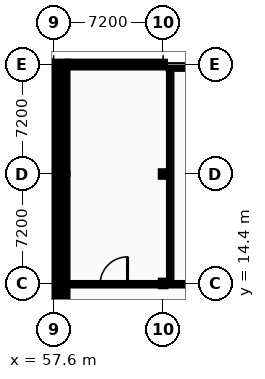
"""IFC4 building model, lengths in metres.
Left out: names, types, materials, properties, quantities, classifications, styles, units other than length and angle.
Written with IfcOpenShell. Run it as: python <this file> out.ifc"""

import sys

from ifc_helpers import new_model, si_unit, direction, frame, frame_2d, origin, origin_2d, place, context, subcontext, project, spatial, rectangle, i_section, extrude, element, fill, save


model = new_model("IFC4")
c1 = context("Model", 3, precision=1e-05, world=origin(), true_north=direction((0.0, 1.0)))
c2 = subcontext(c1, "Body", "Model", "MODEL_VIEW")
j1 = project(units=[si_unit("LENGTHUNIT", "METRE"), si_unit("PLANEANGLEUNIT", "RADIAN")], contexts=[c1])
p1 = place(None, origin())
s1 = spatial("IfcSite", under=j1, at=p1, CompositionType="ELEMENT")
p2 = place(p1, origin())
s2 = spatial("IfcBuilding", under=s1, at=p2, CompositionType="ELEMENT")
p3 = place(p2, frame((0.0, 0.0, 9.6)))
s3 = spatial("IfcBuildingStorey", under=s2, at=p3, CompositionType="ELEMENT", Elevation=9.6)
for number, where, z_axis, x_axis in (
    (1, (57.6, 14.4, 0.0), (0.0, 0.0, 1.0), (1.0, 0.0, 0.0)),
    (2, (57.6, 21.6, 0.0), (0.0, 0.0, 1.0), (1.0, 0.0, 0.0)),
):
    element("IfcColumn", number, at=place(p3, frame(where, z_axis=z_axis, x_axis=x_axis)), inside=s3, PredefinedType="COLUMN", context=c2, shape_type="SweptSolid", body=[
        extrude(i_section(OverallWidth=0.3, OverallDepth=0.36, WebThickness=0.012, FlangeThickness=0.022, FilletRadius=0.027, at=origin_2d()), origin(), (0.0, 0.0, 1.0), 4.4),
    ])
p4 = place(p3, frame((57.6, 28.8, 0.0), z_axis=(0.0, 0.0, 1.0), x_axis=(1.0, 0.0, 0.0)))
e3 = element("IfcColumn", 3, at=p4, inside=s3, PredefinedType="COLUMN", context=c2, shape_type="SweptSolid", body=[
    extrude(i_section(OverallWidth=0.24, OverallDepth=0.24, WebThickness=0.01, FlangeThickness=0.017, FilletRadius=0.021, at=origin_2d()), origin(), (0.0, 0.0, 1.0), 4.4),
])
for number, where, z_axis, x_axis in (
    (4, (58.32, 14.4, 0.0), (0.0, 0.0, 1.0), (1.0, 0.0, 0.0)),
    (5, (58.32, 21.6, 0.0), (0.0, 0.0, 1.0), (1.0, 0.0, 0.0)),
):
    element("IfcColumn", number, at=place(p3, frame(where, z_axis=z_axis, x_axis=x_axis)), inside=s3, PredefinedType="COLUMN", context=c2, shape_type="SweptSolid", body=[
        extrude(i_section(OverallWidth=0.3, OverallDepth=0.36, WebThickness=0.012, FlangeThickness=0.022, FilletRadius=0.027, at=origin_2d()), origin(), (0.0, 0.0, 1.0), 4.4),
    ])
p5 = place(p3, frame((58.32, 28.8, 0.0), z_axis=(0.0, 0.0, 1.0), x_axis=(1.0, 0.0, 0.0)))
e6 = element("IfcColumn", 6, at=p5, inside=s3, PredefinedType="COLUMN", context=c2, shape_type="SweptSolid", body=[
    extrude(i_section(OverallWidth=0.24, OverallDepth=0.24, WebThickness=0.01, FlangeThickness=0.017, FilletRadius=0.021, at=origin_2d()), origin(), (0.0, 0.0, 1.0), 4.4),
])
for number, where, z_axis, x_axis in (
    (7, (64.8, 14.4, 0.0), (0.0, 0.0, 1.0), (1.0, 0.0, 0.0)),
    (8, (64.8, 21.6, 0.0), (0.0, 0.0, 1.0), (1.0, 0.0, 0.0)),
):
    element("IfcColumn", number, at=place(p3, frame(where, z_axis=z_axis, x_axis=x_axis)), inside=s3, PredefinedType="COLUMN", context=c2, shape_type="SweptSolid", body=[
        extrude(i_section(OverallWidth=0.3, OverallDepth=0.36, WebThickness=0.012, FlangeThickness=0.022, FilletRadius=0.027, at=origin_2d()), origin(), (0.0, 0.0, 1.0), 4.4),
    ])
p6 = place(p3, frame((64.8, 28.8, 0.0), z_axis=(0.0, 0.0, 1.0), x_axis=(1.0, 0.0, 0.0)))
e9 = element("IfcColumn", 9, at=p6, inside=s3, PredefinedType="COLUMN", context=c2, shape_type="SweptSolid", body=[
    extrude(i_section(OverallWidth=0.24, OverallDepth=0.24, WebThickness=0.01, FlangeThickness=0.017, FilletRadius=0.021, at=origin_2d()), origin(), (0.0, 0.0, 1.0), 4.4),
])
p7 = place(p3, frame((57.6, 8.9, 0.0), z_axis=(0.0, 0.0, 1.0), x_axis=(0.0, 1.0, 0.0)))
e10 = element("IfcWall", 10, at=p7, inside=s3, PredefinedType="STANDARD", context=c2, shape_type="SweptSolid", body=[
    extrude(rectangle(XDim=5.5, YDim=0.38, at=frame_2d((2.75, 0.0))), origin(), (0.0, 0.0, 1.0), 4.2),
])
p8 = place(p3, frame((57.6, 14.4, 0.0), z_axis=(0.0, 0.0, 1.0), x_axis=(0.0, 1.0, 0.0)))
e11 = element("IfcWall", 11, at=p8, inside=s3, PredefinedType="STANDARD", context=c2, shape_type="SweptSolid", body=[
    extrude(rectangle(XDim=7.2, YDim=0.38, at=frame_2d((3.6, 0.0))), origin(), (0.0, 0.0, 1.0), 3.895),
])
p9 = place(p8, frame((1.594, 0.0, 0.95)))
e12 = element("IfcOpeningElement", 12, at=p9, cuts=e11, PredefinedType="OPENING", context=c2, shape_type="SweptSolid", body=[
    extrude(rectangle(XDim=1.132, YDim=1.368, at=frame_2d((0.566, 0.684))), frame((0.0, 0.2, 0.0), z_axis=(0.0, -1.0, 0.0), x_axis=(1.0, 0.0, 0.0)), (0.0, 0.0, 1.0), 0.4),
])
p10 = place(p8, frame((4.474, 0.0, 0.95)))
e13 = element("IfcOpeningElement", 13, at=p10, cuts=e11, PredefinedType="OPENING", context=c2, shape_type="SweptSolid", body=[
    extrude(rectangle(XDim=1.132, YDim=1.368, at=frame_2d((0.566, 0.684))), frame((0.0, 0.2, 0.0), z_axis=(0.0, -1.0, 0.0), x_axis=(1.0, 0.0, 0.0)), (0.0, 0.0, 1.0), 0.4),
])
p11 = place(p3, frame((57.6, 21.6, 0.0), z_axis=(0.0, 0.0, 1.0), x_axis=(0.0, 1.0, 0.0)))
e14 = element("IfcWall", 14, at=p11, inside=s3, PredefinedType="STANDARD", context=c2, shape_type="SweptSolid", body=[
    extrude(rectangle(XDim=7.39, YDim=0.38, at=frame_2d((3.695, 0.0))), origin(), (0.0, 0.0, 1.0), 3.9),
])
p12 = place(p11, frame((1.634, 0.0, 0.95)))
e15 = element("IfcOpeningElement", 15, at=p12, cuts=e14, PredefinedType="OPENING", context=c2, shape_type="SweptSolid", body=[
    extrude(rectangle(XDim=1.166, YDim=1.368, at=frame_2d((0.583, 0.684))), frame((0.0, 0.2, 0.0), z_axis=(0.0, -1.0, 0.0), x_axis=(1.0, 0.0, 0.0)), (0.0, 0.0, 1.0), 0.4),
])
p13 = place(p11, frame((4.59, 0.0, 0.95)))
e16 = element("IfcOpeningElement", 16, at=p13, cuts=e14, PredefinedType="OPENING", context=c2, shape_type="SweptSolid", body=[
    extrude(rectangle(XDim=1.166, YDim=1.368, at=frame_2d((0.583, 0.684))), frame((0.0, 0.2, 0.0), z_axis=(0.0, -1.0, 0.0), x_axis=(1.0, 0.0, 0.0)), (0.0, 0.0, 1.0), 0.4),
])
p14 = place(p3, frame((64.91, 28.8, 0.0), z_axis=(0.0, 0.0, 1.0), x_axis=(-1.0, 0.0, 0.0)))
e17 = element("IfcWall", 17, at=p14, inside=s3, PredefinedType="STANDARD", context=c2, shape_type="SweptSolid", body=[
    extrude(rectangle(XDim=6.4, YDim=0.38, at=frame_2d((3.2, 0.0))), origin(), (0.0, 0.0, 1.0), 3.9),
])
p15 = place(p3, frame((58.32, 14.4, 0.0), z_axis=(0.0, 0.0, 1.0), x_axis=(0.0, -1.0, 0.0)))
e18 = element("IfcWall", 18, at=p15, inside=s3, PredefinedType="STANDARD", context=c2, shape_type="SweptSolid", body=[
    extrude(rectangle(XDim=5.5, YDim=0.38, at=frame_2d((2.75, 0.0))), origin(), (0.0, 0.0, 1.0), 4.2),
])
p16 = place(p3, frame((58.32, 21.6, 0.0), z_axis=(0.0, 0.0, 1.0), x_axis=(0.0, -1.0, 0.0)))
e19 = element("IfcWall", 19, at=p16, inside=s3, PredefinedType="STANDARD", context=c2, shape_type="SweptSolid", body=[
    extrude(rectangle(XDim=7.2, YDim=0.38, at=frame_2d((3.6, 0.0))), origin(), (0.0, 0.0, 1.0), 3.895),
])
p17 = place(p16, frame((1.713, 0.0, 0.95)))
e20 = element("IfcOpeningElement", 20, at=p17, cuts=e19, PredefinedType="OPENING", context=c2, shape_type="SweptSolid", body=[
    extrude(rectangle(XDim=0.894, YDim=1.332, at=frame_2d((0.447, 0.666))), frame((0.0, 0.2, 0.0), z_axis=(0.0, -1.0, 0.0), x_axis=(1.0, 0.0, 0.0)), (0.0, 0.0, 1.0), 0.4),
])
p18 = place(p16, frame((4.593, 0.0, 0.95)))
e21 = element("IfcOpeningElement", 21, at=p18, cuts=e19, PredefinedType="OPENING", context=c2, shape_type="SweptSolid", body=[
    extrude(rectangle(XDim=0.894, YDim=1.332, at=frame_2d((0.447, 0.666))), frame((0.0, 0.2, 0.0), z_axis=(0.0, -1.0, 0.0), x_axis=(1.0, 0.0, 0.0)), (0.0, 0.0, 1.0), 0.4),
])
p19 = place(p3, frame((58.32, 28.99, 0.0), z_axis=(0.0, 0.0, 1.0), x_axis=(0.0, -1.0, 0.0)))
e22 = element("IfcWall", 22, at=p19, inside=s3, PredefinedType="STANDARD", context=c2, shape_type="SweptSolid", body=[
    extrude(rectangle(XDim=7.39, YDim=0.38, at=frame_2d((3.695, 0.0))), origin(), (0.0, 0.0, 1.0), 3.9),
])
p20 = place(p19, frame((1.753, 0.0, 0.95)))
e23 = element("IfcOpeningElement", 23, at=p20, cuts=e22, PredefinedType="OPENING", context=c2, shape_type="SweptSolid", body=[
    extrude(rectangle(XDim=0.928, YDim=1.332, at=frame_2d((0.464, 0.666))), frame((0.0, 0.2, 0.0), z_axis=(0.0, -1.0, 0.0), x_axis=(1.0, 0.0, 0.0)), (0.0, 0.0, 1.0), 0.4),
])
p21 = place(p19, frame((4.709, 0.0, 0.95)))
e24 = element("IfcOpeningElement", 24, at=p21, cuts=e22, PredefinedType="OPENING", context=c2, shape_type="SweptSolid", body=[
    extrude(rectangle(XDim=0.928, YDim=1.332, at=frame_2d((0.464, 0.666))), frame((0.0, 0.2, 0.0), z_axis=(0.0, -1.0, 0.0), x_axis=(1.0, 0.0, 0.0)), (0.0, 0.0, 1.0), 0.4),
])
p22 = place(p3, frame((58.7, 14.35, 0.0), z_axis=(0.0, 0.0, 1.0), x_axis=(1.0, 0.0, 0.0)))
e25 = element("IfcWall", 25, at=p22, inside=s3, PredefinedType="PARTITIONING", context=c2, shape_type="SweptSolid", body=[
    extrude(rectangle(XDim=5.72, YDim=0.16, at=frame_2d((2.86, 0.0))), origin(), (0.0, 0.0, 1.0), 3.895),
])
p23 = place(p22, frame((1.96, 0.0, 0.0)))
e26 = element("IfcOpeningElement", 26, at=p23, cuts=e25, PredefinedType="OPENING", context=c2, shape_type="SweptSolid", body=[
    extrude(rectangle(XDim=1.8, YDim=2.3, at=frame_2d((0.9, 1.15))), frame((0.0, 0.09, 0.0), z_axis=(0.0, -1.0, 0.0), x_axis=(1.0, 0.0, 0.0)), (0.0, 0.0, 1.0), 0.18),
])
p24 = place(p3, frame((65.18, 14.35, 0.0), z_axis=(0.0, 0.0, 1.0), x_axis=(1.0, 0.0, 0.0)))
e27 = element("IfcWall", 27, at=p24, inside=s3, PredefinedType="PARTITIONING", context=c2, shape_type="SweptSolid", body=[
    extrude(rectangle(XDim=6.44, YDim=0.16, at=frame_2d((3.22, 0.0))), origin(), (0.0, 0.0, 1.0), 3.895),
])
p25 = place(p24, frame((2.515, 0.0, 0.0)))
e28 = element("IfcOpeningElement", 28, at=p25, cuts=e27, PredefinedType="OPENING", context=c2, shape_type="SweptSolid", body=[
    extrude(rectangle(XDim=1.5, YDim=2.2, at=frame_2d((0.75, 1.1))), frame((0.0, 0.09, 0.0), z_axis=(0.0, -1.0, 0.0), x_axis=(1.0, 0.0, 0.0)), (0.0, 0.0, 1.0), 0.18),
])
p26 = place(p3, frame((65.18, 28.6, 0.0), z_axis=(0.0, 0.0, 1.0), x_axis=(1.0, 0.0, 0.0)))
e29 = element("IfcWall", 29, at=p26, inside=s3, PredefinedType="PARTITIONING", context=c2, shape_type="SweptSolid", body=[
    extrude(rectangle(XDim=6.44, YDim=0.16, at=frame_2d((3.22, 0.0))), origin(), (0.0, 0.0, 1.0), 3.9),
])
p27 = place(p3, frame((65.27, 14.43, 0.0), z_axis=(0.0, 0.0, 1.0), x_axis=(0.0, 1.0, 0.0)))
e30 = element("IfcWall", 30, at=p27, inside=s3, PredefinedType="PARTITIONING", context=c2, shape_type="SweptSolid", body=[
    extrude(rectangle(XDim=14.09, YDim=0.16, at=frame_2d((7.045, 0.0))), origin(), (0.0, 0.0, 1.0), 4.2),
])
p28 = place(p9, origin())
e31 = element("IfcWindow", 31, at=p28, inside=s3, PartitioningType="SINGLE_PANEL", PredefinedType="WINDOW", context=c2, shape_type="SweptSolid", body=[
    extrude(rectangle(XDim=1.132, YDim=1.368, at=frame_2d((0.566, 0.684))), frame((0.0, 0.03, 0.0), z_axis=(0.0, -1.0, 0.0), x_axis=(1.0, 0.0, 0.0)), (0.0, 0.0, 1.0), 0.06),
])
fill(e12, e31)
p29 = place(p10, origin())
e32 = element("IfcWindow", 32, at=p29, inside=s3, PartitioningType="SINGLE_PANEL", PredefinedType="WINDOW", context=c2, shape_type="SweptSolid", body=[
    extrude(rectangle(XDim=1.132, YDim=1.368, at=frame_2d((0.566, 0.684))), frame((0.0, 0.03, 0.0), z_axis=(0.0, -1.0, 0.0), x_axis=(1.0, 0.0, 0.0)), (0.0, 0.0, 1.0), 0.06),
])
fill(e13, e32)
p30 = place(p12, origin())
e33 = element("IfcWindow", 33, at=p30, inside=s3, PartitioningType="SINGLE_PANEL", PredefinedType="WINDOW", context=c2, shape_type="SweptSolid", body=[
    extrude(rectangle(XDim=1.166, YDim=1.368, at=frame_2d((0.583, 0.684))), frame((0.0, 0.03, 0.0), z_axis=(0.0, -1.0, 0.0), x_axis=(1.0, 0.0, 0.0)), (0.0, 0.0, 1.0), 0.06),
])
fill(e15, e33)
p31 = place(p13, origin())
e34 = element("IfcWindow", 34, at=p31, inside=s3, PartitioningType="SINGLE_PANEL", PredefinedType="WINDOW", context=c2, shape_type="SweptSolid", body=[
    extrude(rectangle(XDim=1.166, YDim=1.368, at=frame_2d((0.583, 0.684))), frame((0.0, 0.03, 0.0), z_axis=(0.0, -1.0, 0.0), x_axis=(1.0, 0.0, 0.0)), (0.0, 0.0, 1.0), 0.06),
])
fill(e16, e34)
p32 = place(p17, origin())
e35 = element("IfcWindow", 35, at=p32, inside=s3, PartitioningType="SINGLE_PANEL", PredefinedType="WINDOW", context=c2, shape_type="SweptSolid", body=[
    extrude(rectangle(XDim=0.894, YDim=1.332, at=frame_2d((0.447, 0.666))), frame((0.0, 0.03, 0.0), z_axis=(0.0, -1.0, 0.0), x_axis=(1.0, 0.0, 0.0)), (0.0, 0.0, 1.0), 0.06),
])
fill(e20, e35)
p33 = place(p18, origin())
e36 = element("IfcWindow", 36, at=p33, inside=s3, PartitioningType="SINGLE_PANEL", PredefinedType="WINDOW", context=c2, shape_type="SweptSolid", body=[
    extrude(rectangle(XDim=0.894, YDim=1.332, at=frame_2d((0.447, 0.666))), frame((0.0, 0.03, 0.0), z_axis=(0.0, -1.0, 0.0), x_axis=(1.0, 0.0, 0.0)), (0.0, 0.0, 1.0), 0.06),
])
fill(e21, e36)
p34 = place(p20, origin())
e37 = element("IfcWindow", 37, at=p34, inside=s3, PartitioningType="SINGLE_PANEL", PredefinedType="WINDOW", context=c2, shape_type="SweptSolid", body=[
    extrude(rectangle(XDim=0.928, YDim=1.332, at=frame_2d((0.464, 0.666))), frame((0.0, 0.03, 0.0), z_axis=(0.0, -1.0, 0.0), x_axis=(1.0, 0.0, 0.0)), (0.0, 0.0, 1.0), 0.06),
])
fill(e23, e37)
p35 = place(p21, origin())
e38 = element("IfcWindow", 38, at=p35, inside=s3, PartitioningType="SINGLE_PANEL", PredefinedType="WINDOW", context=c2, shape_type="SweptSolid", body=[
    extrude(rectangle(XDim=0.928, YDim=1.332, at=frame_2d((0.464, 0.666))), frame((0.0, 0.03, 0.0), z_axis=(0.0, -1.0, 0.0), x_axis=(1.0, 0.0, 0.0)), (0.0, 0.0, 1.0), 0.06),
])
fill(e24, e38)
p36 = place(p23, frame((1.8, 0.0, 0.0), z_axis=(0.0, 0.0, 1.0), x_axis=(-1.0, 0.0, 0.0)))
e39 = element("IfcDoor", 39, at=p36, inside=s3, OperationType="DOUBLE_DOOR_SINGLE_SWING", PredefinedType="DOOR", context=c2, shape_type="SweptSolid", body=[
    extrude(rectangle(XDim=1.8, YDim=2.3, at=frame_2d((0.9, 1.15))), frame((0.0, 0.025, 0.0), z_axis=(0.0, -1.0, 0.0), x_axis=(1.0, 0.0, 0.0)), (0.0, 0.0, 1.0), 0.05),
])
fill(e26, e39)
save(model, sys.argv[1])
